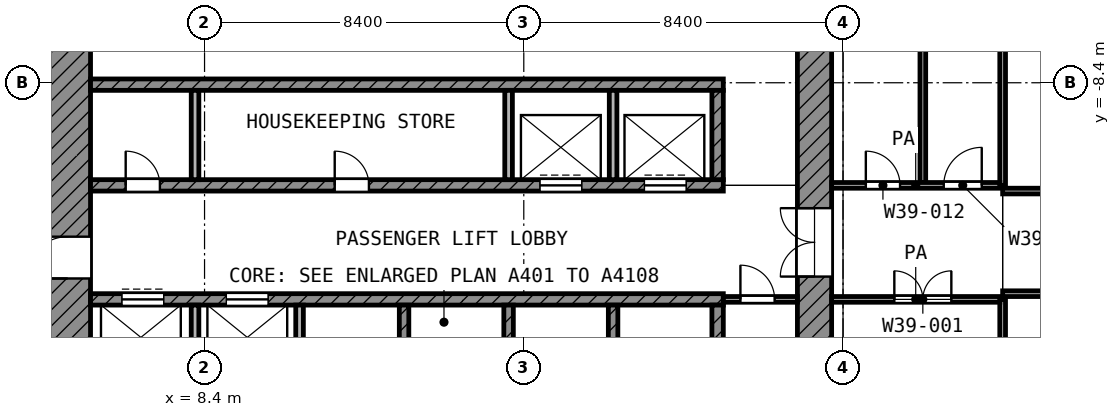
"""IFC4 building model, lengths in metres.
Left out: names, types, materials, properties, quantities, classifications, styles, units other than length and angle.
Written with IfcOpenShell. Run it as: python <this file> out.ifc"""

import sys

from ifc_helpers import new_model, si_unit, direction, frame, frame_2d, origin, place, context, subcontext, project, spatial, rectangle, extrude, element, fill, save


model = new_model("IFC4")
c1 = context("Model", 3, precision=1e-05, world=origin(), true_north=direction((0.0, 1.0)))
c2 = subcontext(c1, "Body", "Model", "MODEL_VIEW")
j1 = project(units=[si_unit("LENGTHUNIT", "METRE"), si_unit("PLANEANGLEUNIT", "RADIAN")], contexts=[c1])
p1 = place(None, origin())
s1 = spatial("IfcSite", under=j1, at=p1, CompositionType="ELEMENT")
p2 = place(p1, origin())
s2 = spatial("IfcBuilding", under=s1, at=p2, CompositionType="ELEMENT")
p3 = place(p2, frame((0.0, 0.0, 192.0)))
s3 = spatial("IfcBuildingStorey", under=s2, at=p3, CompositionType="ELEMENT", Elevation=192.0)
p4 = place(p3, frame((4.8, -24.9, 0.0), z_axis=(0.0, 0.0, 1.0), x_axis=(0.0, 1.0, 0.0)))
e1 = element("IfcWall", 1, at=p4, inside=s3, PredefinedType="SHEAR", context=c2, shape_type="SweptSolid", body=[
    extrude(rectangle(XDim=19.5, YDim=1.2, at=frame_2d((9.75, 0.0))), origin(), (0.0, 0.0, 1.0), 3.6),
])
p5 = place(p4, frame((11.35, 0.0, 0.0)))
e2 = element("IfcOpeningElement", 2, at=p5, cuts=e1, PredefinedType="OPENING", context=c2, shape_type="SweptSolid", body=[
    extrude(rectangle(XDim=1.1, YDim=2.1, at=frame_2d((0.55, 1.05))), frame((0.0, 0.61, 0.0), z_axis=(0.0, -1.0, 0.0), x_axis=(1.0, 0.0, 0.0)), (0.0, 0.0, 1.0), 1.22),
])
p6 = place(p4, frame((2.05, 0.0, 0.0)))
e3 = element("IfcOpeningElement", 3, at=p6, cuts=e1, PredefinedType="OPENING", context=c2, shape_type="SweptSolid", body=[
    extrude(rectangle(XDim=1.1, YDim=2.1, at=frame_2d((0.55, 1.05))), frame((0.0, 0.61, 0.0), z_axis=(0.0, -1.0, 0.0), x_axis=(1.0, 0.0, 0.0)), (0.0, 0.0, 1.0), 1.22),
])
p7 = place(p3, frame((24.45, -24.0, 0.0), z_axis=(0.0, 0.0, 1.0), x_axis=(0.0, 1.0, 0.0)))
e4 = element("IfcWall", 4, at=p7, inside=s3, PredefinedType="SHEAR", context=c2, shape_type="SweptSolid", body=[
    extrude(rectangle(XDim=18.6, YDim=0.9, at=frame_2d((9.3, 0.0))), origin(), (0.0, 0.0, 1.0), 3.6),
])
p8 = place(p7, frame((10.5, 0.0, 0.0)))
e5 = element("IfcOpeningElement", 5, at=p8, cuts=e4, PredefinedType="OPENING", context=c2, shape_type="SweptSolid", body=[
    extrude(rectangle(XDim=1.8, YDim=2.1, at=frame_2d((0.9, 1.05))), frame((0.0, 0.46, 0.0), z_axis=(0.0, -1.0, 0.0), x_axis=(1.0, 0.0, 0.0)), (0.0, 0.0, 1.0), 0.92),
])
p9 = place(p3, frame((5.4, -8.45, 0.0), z_axis=(0.0, 0.0, 1.0), x_axis=(1.0, 0.0, 0.0)))
e6 = element("IfcWall", 6, at=p9, inside=s3, PredefinedType="SHEAR", context=c2, shape_type="SweptSolid", body=[
    extrude(rectangle(XDim=16.65, YDim=0.3, at=frame_2d((8.325, 0.0))), origin(), (0.0, 0.0, 1.0), 3.6),
])
p10 = place(p3, frame((5.4, -11.1, 0.0), z_axis=(0.0, 0.0, 1.0), x_axis=(1.0, 0.0, 0.0)))
e7 = element("IfcWall", 7, at=p10, inside=s3, PredefinedType="SHEAR", context=c2, shape_type="SweptSolid", body=[
    extrude(rectangle(XDim=16.65, YDim=0.3, at=frame_2d((8.325, 0.0))), origin(), (0.0, 0.0, 1.0), 3.6),
])
p11 = place(p10, frame((11.825, 0.0, 0.0)))
e8 = element("IfcOpeningElement", 8, at=p11, cuts=e7, PredefinedType="OPENING", context=c2, shape_type="SweptSolid", body=[
    extrude(rectangle(XDim=1.1, YDim=2.1, at=frame_2d((0.55, 1.05))), frame((0.0, 0.16, 0.0), z_axis=(0.0, -1.0, 0.0), x_axis=(1.0, 0.0, 0.0)), (0.0, 0.0, 1.0), 0.32),
])
p12 = place(p10, frame((14.575, 0.0, 0.0)))
e9 = element("IfcOpeningElement", 9, at=p12, cuts=e7, PredefinedType="OPENING", context=c2, shape_type="SweptSolid", body=[
    extrude(rectangle(XDim=1.1, YDim=2.1, at=frame_2d((0.55, 1.05))), frame((0.0, 0.16, 0.0), z_axis=(0.0, -1.0, 0.0), x_axis=(1.0, 0.0, 0.0)), (0.0, 0.0, 1.0), 0.32),
])
p13 = place(p10, frame((0.925, 0.0, 0.0)))
e10 = element("IfcOpeningElement", 10, at=p13, cuts=e7, PredefinedType="OPENING", context=c2, shape_type="SweptSolid", body=[
    extrude(rectangle(XDim=0.9, YDim=2.1, at=frame_2d((0.45, 1.05))), frame((0.0, 0.16, 0.0), z_axis=(0.0, -1.0, 0.0), x_axis=(1.0, 0.0, 0.0)), (0.0, 0.0, 1.0), 0.32),
])
p14 = place(p10, frame((6.425, 0.0, 0.0)))
e11 = element("IfcOpeningElement", 11, at=p14, cuts=e7, PredefinedType="OPENING", context=c2, shape_type="SweptSolid", body=[
    extrude(rectangle(XDim=0.9, YDim=2.1, at=frame_2d((0.45, 1.05))), frame((0.0, 0.16, 0.0), z_axis=(0.0, -1.0, 0.0), x_axis=(1.0, 0.0, 0.0)), (0.0, 0.0, 1.0), 0.32),
])
p15 = place(p3, frame((5.4, -14.1, 0.0), z_axis=(0.0, 0.0, 1.0), x_axis=(1.0, 0.0, 0.0)))
e12 = element("IfcWall", 12, at=p15, inside=s3, PredefinedType="SHEAR", context=c2, shape_type="SweptSolid", body=[
    extrude(rectangle(XDim=16.65, YDim=0.3, at=frame_2d((8.325, 0.0))), origin(), (0.0, 0.0, 1.0), 3.6),
])
p16 = place(p15, frame((0.825, 0.0, 0.0)))
e13 = element("IfcOpeningElement", 13, at=p16, cuts=e12, PredefinedType="OPENING", context=c2, shape_type="SweptSolid", body=[
    extrude(rectangle(XDim=1.1, YDim=2.1, at=frame_2d((0.55, 1.05))), frame((0.0, 0.16, 0.0), z_axis=(0.0, -1.0, 0.0), x_axis=(1.0, 0.0, 0.0)), (0.0, 0.0, 1.0), 0.32),
])
p17 = place(p15, frame((3.575, 0.0, 0.0)))
e14 = element("IfcOpeningElement", 14, at=p17, cuts=e12, PredefinedType="OPENING", context=c2, shape_type="SweptSolid", body=[
    extrude(rectangle(XDim=1.1, YDim=2.1, at=frame_2d((0.55, 1.05))), frame((0.0, 0.16, 0.0), z_axis=(0.0, -1.0, 0.0), x_axis=(1.0, 0.0, 0.0)), (0.0, 0.0, 1.0), 0.32),
])
p18 = place(p3, frame((21.9, -10.95, 0.0), z_axis=(0.0, 0.0, 1.0), x_axis=(0.0, 1.0, 0.0)))
e15 = element("IfcWall", 15, at=p18, inside=s3, PredefinedType="SHEAR", context=c2, shape_type="SweptSolid", body=[
    extrude(rectangle(XDim=2.35, YDim=0.3, at=frame_2d((1.175, 0.0))), origin(), (0.0, 0.0, 1.0), 3.6),
])
p19 = place(p3, frame((21.9, -16.6, 0.0), z_axis=(0.0, 0.0, 1.0), x_axis=(0.0, 1.0, 0.0)))
e16 = element("IfcWall", 16, at=p19, inside=s3, PredefinedType="SHEAR", context=c2, shape_type="SweptSolid", body=[
    extrude(rectangle(XDim=2.35, YDim=0.3, at=frame_2d((1.175, 0.0))), origin(), (0.0, 0.0, 1.0), 3.6),
])
for number, where, z_axis, x_axis in (
    (17, (8.15, -10.95, 0.0), (0.0, 0.0, 1.0), (0.0, 1.0, 0.0)),
    (18, (16.4, -10.95, 0.0), (0.0, 0.0, 1.0), (0.0, 1.0, 0.0)),
    (19, (19.15, -10.95, 0.0), (0.0, 0.0, 1.0), (0.0, 1.0, 0.0)),
):
    element("IfcWall", number, at=place(p3, frame(where, z_axis=z_axis, x_axis=x_axis)), inside=s3, PredefinedType="PARTITIONING", context=c2, shape_type="SweptSolid", body=[
        extrude(rectangle(XDim=2.35, YDim=0.2, at=frame_2d((1.175, 0.0))), origin(), (0.0, 0.0, 1.0), 3.6),
    ])
for number, where, z_axis, x_axis in (
    (20, (8.15, -16.6, 0.0), (0.0, 0.0, 1.0), (0.0, 1.0, 0.0)),
    (21, (10.9, -16.6, 0.0), (0.0, 0.0, 1.0), (0.0, 1.0, 0.0)),
):
    element("IfcWall", number, at=place(p3, frame(where, z_axis=z_axis, x_axis=x_axis)), inside=s3, PredefinedType="PARTITIONING", context=c2, shape_type="SweptSolid", body=[
        extrude(rectangle(XDim=2.35, YDim=0.2, at=frame_2d((1.175, 0.0))), origin(), (0.0, 0.0, 1.0), 3.6),
    ])
for number, where, z_axis, x_axis in (
    (22, (13.65, -16.6, 0.0), (0.0, 0.0, 1.0), (0.0, 1.0, 0.0)),
    (23, (16.4, -16.6, 0.0), (0.0, 0.0, 1.0), (0.0, 1.0, 0.0)),
    (24, (19.15, -16.6, 0.0), (0.0, 0.0, 1.0), (0.0, 1.0, 0.0)),
):
    element("IfcWall", number, at=place(p3, frame(where, z_axis=z_axis, x_axis=x_axis)), inside=s3, PredefinedType="SHEAR", context=c2, shape_type="SweptSolid", body=[
        extrude(rectangle(XDim=2.35, YDim=0.25, at=frame_2d((1.175, 0.0))), origin(), (0.0, 0.0, 1.0), 3.6),
    ])
p20 = place(p3, frame((22.05, -14.1, 0.0), z_axis=(0.0, 0.0, 1.0), x_axis=(1.0, 0.0, 0.0)))
e25 = element("IfcWall", 25, at=p20, inside=s3, PredefinedType="PARTITIONING", context=c2, shape_type="SweptSolid", body=[
    extrude(rectangle(XDim=1.95, YDim=0.15, at=frame_2d((0.975, 0.0))), origin(), (0.0, 0.0, 1.0), 3.6),
])
p21 = place(p20, frame((0.45, 0.0, 0.0)))
e26 = element("IfcOpeningElement", 26, at=p21, cuts=e25, PredefinedType="OPENING", context=c2, shape_type="SweptSolid", body=[
    extrude(rectangle(XDim=0.9, YDim=2.1, at=frame_2d((0.45, 1.05))), frame((0.0, 0.085, 0.0), z_axis=(0.0, -1.0, 0.0), x_axis=(1.0, 0.0, 0.0)), (0.0, 0.0, 1.0), 0.17),
])
p22 = place(p3, frame((24.9, -14.1, 0.0), z_axis=(0.0, 0.0, 1.0), x_axis=(1.0, 0.0, 0.0)))
e27 = element("IfcWall", 27, at=p22, inside=s3, PredefinedType="PARTITIONING", context=c2, shape_type="SweptSolid", body=[
    extrude(rectangle(XDim=4.425, YDim=0.15, at=frame_2d((2.212, 0.0))), origin(), (0.0, 0.0, 1.0), 3.6),
])
p23 = place(p22, frame((1.65, 0.0, 0.0)))
e28 = element("IfcOpeningElement", 28, at=p23, cuts=e27, PredefinedType="OPENING", context=c2, shape_type="SweptSolid", body=[
    extrude(rectangle(XDim=1.5, YDim=2.1, at=frame_2d((0.75, 1.05))), frame((0.0, 0.085, 0.0), z_axis=(0.0, -1.0, 0.0), x_axis=(1.0, 0.0, 0.0)), (0.0, 0.0, 1.0), 0.17),
])
p24 = place(p3, frame((29.4, -13.95, 0.0), z_axis=(0.0, 0.0, 1.0), x_axis=(1.0, 0.0, 0.0)))
e29 = element("IfcWall", 29, at=p24, inside=s3, PredefinedType="PARTITIONING", context=c2, shape_type="SweptSolid", body=[
    extrude(rectangle(XDim=37.72, YDim=0.15, at=frame_2d((18.86, 0.0))), origin(), (0.0, 0.0, 1.0), 3.6),
])
p25 = place(p24, frame((1.6, 0.0, 0.0)))
e30 = element("IfcOpeningElement", 30, at=p25, cuts=e29, PredefinedType="OPENING", context=c2, shape_type="SweptSolid", body=[
    extrude(rectangle(XDim=1.0, YDim=2.1, at=frame_2d((0.5, 1.05))), frame((0.0, 0.085, 0.0), z_axis=(0.0, -1.0, 0.0), x_axis=(1.0, 0.0, 0.0)), (0.0, 0.0, 1.0), 0.17),
])
p26 = place(p24, frame((5.55, 0.0, 0.0)))
e31 = element("IfcOpeningElement", 31, at=p26, cuts=e29, PredefinedType="OPENING", context=c2, shape_type="SweptSolid", body=[
    extrude(rectangle(XDim=1.2, YDim=2.1, at=frame_2d((0.6, 1.05))), frame((0.0, 0.085, 0.0), z_axis=(0.0, -1.0, 0.0), x_axis=(1.0, 0.0, 0.0)), (0.0, 0.0, 1.0), 0.17),
])
p27 = place(p24, frame((11.2, 0.0, 0.0)))
e32 = element("IfcOpeningElement", 32, at=p27, cuts=e29, PredefinedType="OPENING", context=c2, shape_type="SweptSolid", body=[
    extrude(rectangle(XDim=1.2, YDim=2.1, at=frame_2d((0.6, 1.05))), frame((0.0, 0.085, 0.0), z_axis=(0.0, -1.0, 0.0), x_axis=(1.0, 0.0, 0.0)), (0.0, 0.0, 1.0), 0.17),
])
p28 = place(p24, frame((14.35, 0.0, 0.0)))
e33 = element("IfcOpeningElement", 33, at=p28, cuts=e29, PredefinedType="OPENING", context=c2, shape_type="SweptSolid", body=[
    extrude(rectangle(XDim=1.0, YDim=2.1, at=frame_2d((0.5, 1.05))), frame((0.0, 0.085, 0.0), z_axis=(0.0, -1.0, 0.0), x_axis=(1.0, 0.0, 0.0)), (0.0, 0.0, 1.0), 0.17),
])
p29 = place(p24, frame((19.6, 0.0, 0.0)))
e34 = element("IfcOpeningElement", 34, at=p29, cuts=e29, PredefinedType="OPENING", context=c2, shape_type="SweptSolid", body=[
    extrude(rectangle(XDim=1.2, YDim=2.1, at=frame_2d((0.6, 1.05))), frame((0.0, 0.085, 0.0), z_axis=(0.0, -1.0, 0.0), x_axis=(1.0, 0.0, 0.0)), (0.0, 0.0, 1.0), 0.17),
])
p30 = place(p24, frame((21.2, 0.0, 0.0)))
e35 = element("IfcOpeningElement", 35, at=p30, cuts=e29, PredefinedType="OPENING", context=c2, shape_type="SweptSolid", body=[
    extrude(rectangle(XDim=1.1, YDim=2.1, at=frame_2d((0.55, 1.05))), frame((0.0, 0.085, 0.0), z_axis=(0.0, -1.0, 0.0), x_axis=(1.0, 0.0, 0.0)), (0.0, 0.0, 1.0), 0.17),
])
p31 = place(p24, frame((27.9, 0.0, 0.0)))
e36 = element("IfcOpeningElement", 36, at=p31, cuts=e29, PredefinedType="OPENING", context=c2, shape_type="SweptSolid", body=[
    extrude(rectangle(XDim=1.2, YDim=2.1, at=frame_2d((0.6, 1.05))), frame((0.0, 0.085, 0.0), z_axis=(0.0, -1.0, 0.0), x_axis=(1.0, 0.0, 0.0)), (0.0, 0.0, 1.0), 0.17),
])
p32 = place(p24, frame((31.0, 0.0, 0.0)))
e37 = element("IfcOpeningElement", 37, at=p32, cuts=e29, PredefinedType="OPENING", context=c2, shape_type="SweptSolid", body=[
    extrude(rectangle(XDim=1.0, YDim=2.1, at=frame_2d((0.5, 1.05))), frame((0.0, 0.085, 0.0), z_axis=(0.0, -1.0, 0.0), x_axis=(1.0, 0.0, 0.0)), (0.0, 0.0, 1.0), 0.17),
])
p33 = place(p24, frame((35.2, 0.0, 0.0)))
e38 = element("IfcOpeningElement", 38, at=p33, cuts=e29, PredefinedType="OPENING", context=c2, shape_type="SweptSolid", body=[
    extrude(rectangle(XDim=1.0, YDim=2.1, at=frame_2d((0.5, 1.05))), frame((0.0, 0.085, 0.0), z_axis=(0.0, -1.0, 0.0), x_axis=(1.0, 0.0, 0.0)), (0.0, 0.0, 1.0), 0.17),
])
p34 = place(p3, frame((29.4, -11.25, 0.0), z_axis=(0.0, 0.0, 1.0), x_axis=(1.0, 0.0, 0.0)))
e39 = element("IfcWall", 39, at=p34, inside=s3, PredefinedType="PARTITIONING", context=c2, shape_type="SweptSolid", body=[
    extrude(rectangle(XDim=10.782, YDim=0.15, at=frame_2d((5.391, 0.0))), origin(), (0.0, 0.0, 1.0), 3.6),
])
p35 = place(p34, frame((4.5, 0.0, 0.0)))
e40 = element("IfcOpeningElement", 40, at=p35, cuts=e39, PredefinedType="OPENING", context=c2, shape_type="SweptSolid", body=[
    extrude(rectangle(XDim=1.2, YDim=2.1, at=frame_2d((0.6, 1.05))), frame((0.0, 0.085, 0.0), z_axis=(0.0, -1.0, 0.0), x_axis=(1.0, 0.0, 0.0)), (0.0, 0.0, 1.0), 0.17),
])
p36 = place(p34, frame((1.5, 0.0, 0.0)))
e41 = element("IfcOpeningElement", 41, at=p36, cuts=e39, PredefinedType="OPENING", context=c2, shape_type="SweptSolid", body=[
    extrude(rectangle(XDim=1.2, YDim=2.1, at=frame_2d((0.6, 1.05))), frame((0.0, 0.085, 0.0), z_axis=(0.0, -1.0, 0.0), x_axis=(1.0, 0.0, 0.0)), (0.0, 0.0, 1.0), 0.17),
])
p37 = place(p3, frame((24.9, -11.1, 0.0), z_axis=(0.0, 0.0, 1.0), x_axis=(1.0, 0.0, 0.0)))
e42 = element("IfcWall", 42, at=p37, inside=s3, PredefinedType="PARTITIONING", context=c2, shape_type="SweptSolid", body=[
    extrude(rectangle(XDim=4.425, YDim=0.15, at=frame_2d((2.212, 0.0))), origin(), (0.0, 0.0, 1.0), 3.6),
])
p38 = place(p37, frame((0.9, 0.0, 0.0)))
e43 = element("IfcOpeningElement", 43, at=p38, cuts=e42, PredefinedType="OPENING", context=c2, shape_type="SweptSolid", body=[
    extrude(rectangle(XDim=0.9, YDim=2.1, at=frame_2d((0.45, 1.05))), frame((0.0, 0.085, 0.0), z_axis=(0.0, -1.0, 0.0), x_axis=(1.0, 0.0, 0.0)), (0.0, 0.0, 1.0), 0.17),
])
p39 = place(p37, frame((2.95, 0.0, 0.0)))
e44 = element("IfcOpeningElement", 44, at=p39, cuts=e42, PredefinedType="OPENING", context=c2, shape_type="SweptSolid", body=[
    extrude(rectangle(XDim=1.0, YDim=2.1, at=frame_2d((0.5, 1.05))), frame((0.0, 0.085, 0.0), z_axis=(0.0, -1.0, 0.0), x_axis=(1.0, 0.0, 0.0)), (0.0, 0.0, 1.0), 0.17),
])
p40 = place(p3, frame((27.3, -11.025, 0.0), z_axis=(0.0, 0.0, 1.0), x_axis=(0.0, 1.0, 0.0)))
e45 = element("IfcWall", 45, at=p40, inside=s3, PredefinedType="PARTITIONING", context=c2, shape_type="SweptSolid", body=[
    extrude(rectangle(XDim=10.945, YDim=0.15, at=frame_2d((5.472, 0.0))), origin(), (0.0, 0.0, 1.0), 2.7),
])
p41 = place(p3, frame((29.4, -31.198, 0.0), z_axis=(0.0, 0.0, 1.0), x_axis=(0.0, 1.0, 0.0)))
e46 = element("IfcWall", 46, at=p41, inside=s3, PredefinedType="PARTITIONING", context=c2, shape_type="SweptSolid", body=[
    extrude(rectangle(XDim=17.098, YDim=0.15, at=frame_2d((8.549, 0.0))), origin(), (0.0, 0.0, 1.0), 3.6),
])
p42 = place(p3, frame((29.4, -11.1, 0.0), z_axis=(0.0, 0.0, 1.0), x_axis=(0.0, 1.0, 0.0)))
e47 = element("IfcWall", 47, at=p42, inside=s3, PredefinedType="PARTITIONING", context=c2, shape_type="SweptSolid", body=[
    extrude(rectangle(XDim=11.02, YDim=0.15, at=frame_2d((5.51, 0.0))), origin(), (0.0, 0.0, 1.0), 2.7),
])
p43 = place(p11, origin())
e48 = element("IfcDoor", 48, at=p43, inside=s3, OperationType="DOUBLE_DOOR_SLIDING", PredefinedType="DOOR", context=c2, shape_type="SweptSolid", body=[
    extrude(rectangle(XDim=1.1, YDim=2.1, at=frame_2d((0.55, 1.05))), frame((0.0, 0.025, 0.0), z_axis=(0.0, -1.0, 0.0), x_axis=(1.0, 0.0, 0.0)), (0.0, 0.0, 1.0), 0.05),
])
fill(e8, e48)
p44 = place(p12, origin())
e49 = element("IfcDoor", 49, at=p44, inside=s3, OperationType="DOUBLE_DOOR_SLIDING", PredefinedType="DOOR", context=c2, shape_type="SweptSolid", body=[
    extrude(rectangle(XDim=1.1, YDim=2.1, at=frame_2d((0.55, 1.05))), frame((0.0, 0.025, 0.0), z_axis=(0.0, -1.0, 0.0), x_axis=(1.0, 0.0, 0.0)), (0.0, 0.0, 1.0), 0.05),
])
fill(e9, e49)
p45 = place(p16, origin())
e50 = element("IfcDoor", 50, at=p45, inside=s3, OperationType="DOUBLE_DOOR_SLIDING", PredefinedType="DOOR", context=c2, shape_type="SweptSolid", body=[
    extrude(rectangle(XDim=1.1, YDim=2.1, at=frame_2d((0.55, 1.05))), frame((0.0, 0.025, 0.0), z_axis=(0.0, -1.0, 0.0), x_axis=(1.0, 0.0, 0.0)), (0.0, 0.0, 1.0), 0.05),
])
fill(e13, e50)
p46 = place(p17, origin())
e51 = element("IfcDoor", 51, at=p46, inside=s3, OperationType="DOUBLE_DOOR_SLIDING", PredefinedType="DOOR", context=c2, shape_type="SweptSolid", body=[
    extrude(rectangle(XDim=1.1, YDim=2.1, at=frame_2d((0.55, 1.05))), frame((0.0, 0.025, 0.0), z_axis=(0.0, -1.0, 0.0), x_axis=(1.0, 0.0, 0.0)), (0.0, 0.0, 1.0), 0.05),
])
fill(e14, e51)
p47 = place(p5, origin())
e52 = element("IfcDoor", 52, at=p47, inside=s3, OperationType="SINGLE_SWING_LEFT", PredefinedType="DOOR", context=c2, shape_type="SweptSolid", body=[
    extrude(rectangle(XDim=1.1, YDim=2.1, at=frame_2d((0.55, 1.05))), frame((0.0, 0.025, 0.0), z_axis=(0.0, -1.0, 0.0), x_axis=(1.0, 0.0, 0.0)), (0.0, 0.0, 1.0), 0.05),
])
fill(e2, e52)
p48 = place(p8, origin())
e53 = element("IfcDoor", 53, at=p48, inside=s3, OperationType="DOUBLE_DOOR_SINGLE_SWING", PredefinedType="DOOR", context=c2, shape_type="SweptSolid", body=[
    extrude(rectangle(XDim=1.8, YDim=2.1, at=frame_2d((0.9, 1.05))), frame((0.0, 0.025, 0.0), z_axis=(0.0, -1.0, 0.0), x_axis=(1.0, 0.0, 0.0)), (0.0, 0.0, 1.0), 0.05),
])
fill(e5, e53)
p49 = place(p21, origin())
e54 = element("IfcDoor", 54, at=p49, inside=s3, OperationType="SINGLE_SWING_LEFT", PredefinedType="DOOR", context=c2, shape_type="SweptSolid", body=[
    extrude(rectangle(XDim=0.9, YDim=2.1, at=frame_2d((0.45, 1.05))), frame((0.0, 0.025, 0.0), z_axis=(0.0, -1.0, 0.0), x_axis=(1.0, 0.0, 0.0)), (0.0, 0.0, 1.0), 0.05),
])
fill(e26, e54)
p50 = place(p13, origin())
e55 = element("IfcDoor", 55, at=p50, inside=s3, OperationType="SINGLE_SWING_LEFT", PredefinedType="DOOR", context=c2, shape_type="SweptSolid", body=[
    extrude(rectangle(XDim=0.9, YDim=2.1, at=frame_2d((0.45, 1.05))), frame((0.0, 0.025, 0.0), z_axis=(0.0, -1.0, 0.0), x_axis=(1.0, 0.0, 0.0)), (0.0, 0.0, 1.0), 0.05),
])
fill(e10, e55)
p51 = place(p14, origin())
e56 = element("IfcDoor", 56, at=p51, inside=s3, OperationType="SINGLE_SWING_LEFT", PredefinedType="DOOR", context=c2, shape_type="SweptSolid", body=[
    extrude(rectangle(XDim=0.9, YDim=2.1, at=frame_2d((0.45, 1.05))), frame((0.0, 0.025, 0.0), z_axis=(0.0, -1.0, 0.0), x_axis=(1.0, 0.0, 0.0)), (0.0, 0.0, 1.0), 0.05),
])
fill(e11, e56)
p52 = place(p23, origin())
e57 = element("IfcDoor", 57, at=p52, inside=s3, OperationType="DOUBLE_DOOR_SINGLE_SWING", PredefinedType="DOOR", context=c2, shape_type="SweptSolid", body=[
    extrude(rectangle(XDim=1.5, YDim=2.1, at=frame_2d((0.75, 1.05))), frame((0.0, 0.025, 0.0), z_axis=(0.0, -1.0, 0.0), x_axis=(1.0, 0.0, 0.0)), (0.0, 0.0, 1.0), 0.05),
])
fill(e28, e57)
p53 = place(p38, origin())
e58 = element("IfcDoor", 58, at=p53, inside=s3, OperationType="SINGLE_SWING_LEFT", PredefinedType="DOOR", context=c2, shape_type="SweptSolid", body=[
    extrude(rectangle(XDim=0.9, YDim=2.1, at=frame_2d((0.45, 1.05))), frame((0.0, 0.025, 0.0), z_axis=(0.0, -1.0, 0.0), x_axis=(1.0, 0.0, 0.0)), (0.0, 0.0, 1.0), 0.05),
])
fill(e43, e58)
p54 = place(p39, origin())
e59 = element("IfcDoor", 59, at=p54, inside=s3, OperationType="SINGLE_SWING_RIGHT", PredefinedType="DOOR", context=c2, shape_type="SweptSolid", body=[
    extrude(rectangle(XDim=1.0, YDim=2.1, at=frame_2d((0.5, 1.05))), frame((0.0, 0.025, 0.0), z_axis=(0.0, -1.0, 0.0), x_axis=(1.0, 0.0, 0.0)), (0.0, 0.0, 1.0), 0.05),
])
fill(e44, e59)
save(model, sys.argv[1])
